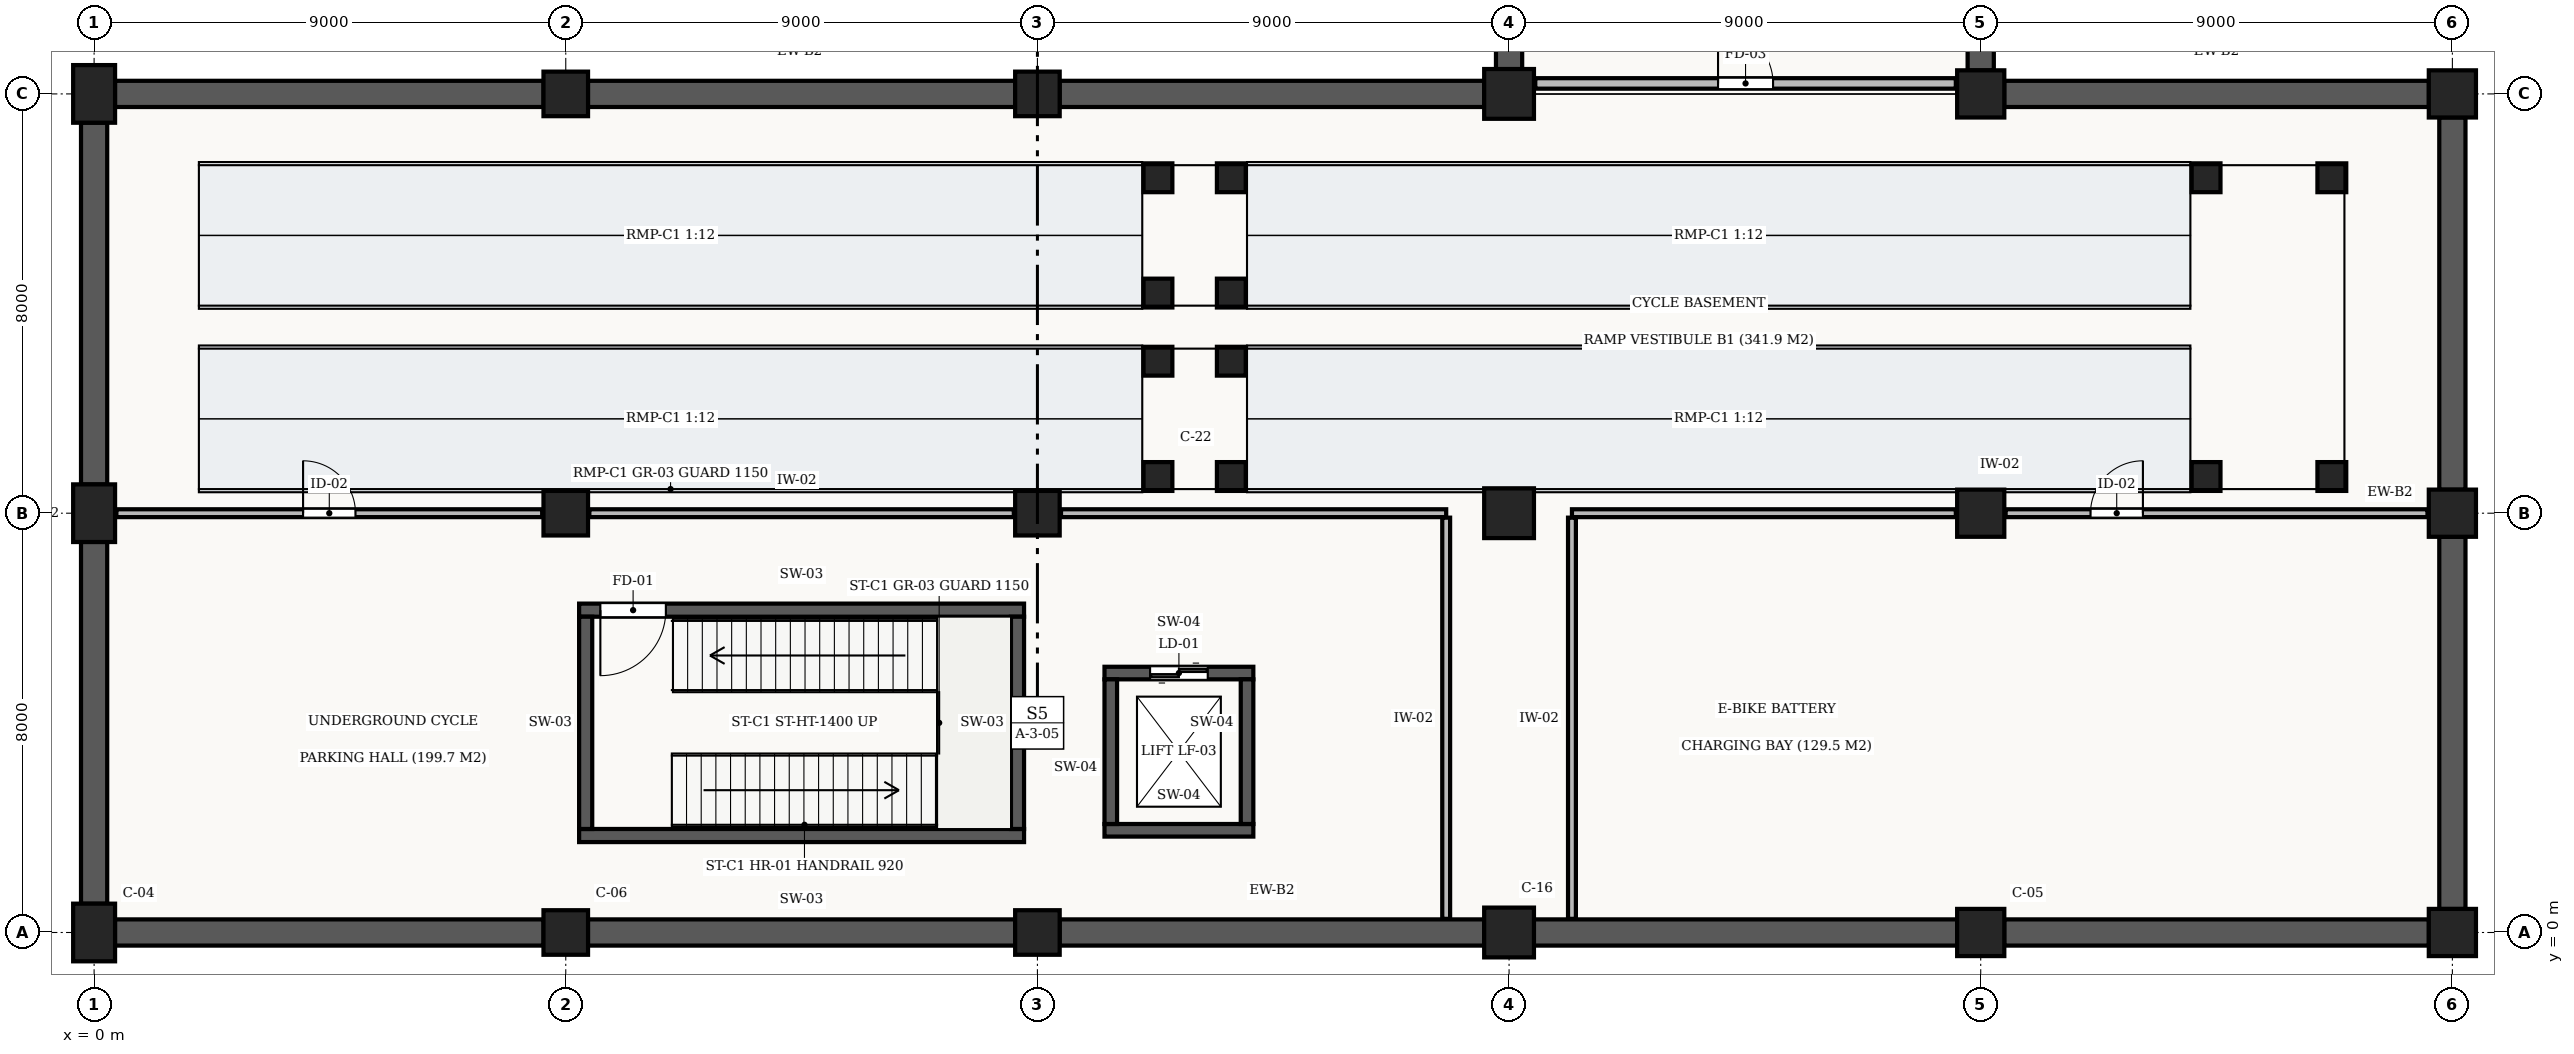
"""IFC4 building model, lengths in metres.
Left out: names, types, materials, properties, quantities, classifications, styles, units other than length and angle.
Written with IfcOpenShell. Run it as: python <this file> out.ifc"""

import sys

from ifc_helpers import new_model, si_unit, direction, frame, frame_2d, origin, origin_2d, place, context, subcontext, project, spatial, rectangle, extrude, element, fill, save


model = new_model("IFC4")
c1 = context("Model", 3, precision=1e-05, world=origin(), true_north=direction((0.0, 1.0)))
c2 = subcontext(c1, "Body", "Model", "MODEL_VIEW")
j1 = project(units=[si_unit("LENGTHUNIT", "METRE"), si_unit("PLANEANGLEUNIT", "RADIAN")], contexts=[c1])
p1 = place(None, origin())
s1 = spatial("IfcSite", under=j1, at=p1, CompositionType="ELEMENT")
p2 = place(p1, origin())
s2 = spatial("IfcBuilding", under=s1, at=p2, CompositionType="ELEMENT")
p3 = place(p2, frame((0.0, 0.0, -6.0)))
s3 = spatial("IfcBuildingStorey", under=s2, at=p3, CompositionType="ELEMENT", Elevation=-6.0)
for number, where, z_axis, x_axis in (
    (1, (0.0, 0.0, 0.0), (0.0, 0.0, 1.0), (1.0, 0.0, 0.0)),
    (2, (0.0, 8.0, 0.0), (0.0, 0.0, 1.0), (1.0, 0.0, 0.0)),
    (3, (0.0, 16.0, 0.0), (0.0, 0.0, 1.0), (1.0, 0.0, 0.0)),
):
    element("IfcColumn", number, at=place(p3, frame(where, z_axis=z_axis, x_axis=x_axis)), inside=s3, PredefinedType="COLUMN", context=c2, shape_type="SweptSolid", body=[
        extrude(rectangle(XDim=0.8, YDim=1.1, at=origin_2d()), origin(), (0.0, 0.0, 1.0), 6.0),
    ])
for number, where, z_axis, x_axis in (
    (4, (9.0, 0.0, 0.0), (0.0, 0.0, 1.0), (1.0, 0.0, 0.0)),
    (5, (9.0, 8.0, 0.0), (0.0, 0.0, 1.0), (1.0, 0.0, 0.0)),
    (6, (9.0, 16.0, 0.0), (0.0, 0.0, 1.0), (1.0, 0.0, 0.0)),
    (7, (18.0, 0.0, 0.0), (0.0, 0.0, 1.0), (1.0, 0.0, 0.0)),
    (8, (18.0, 8.0, 0.0), (0.0, 0.0, 1.0), (1.0, 0.0, 0.0)),
    (9, (18.0, 16.0, 0.0), (0.0, 0.0, 1.0), (1.0, 0.0, 0.0)),
):
    element("IfcColumn", number, at=place(p3, frame(where, z_axis=z_axis, x_axis=x_axis)), inside=s3, PredefinedType="COLUMN", context=c2, shape_type="SweptSolid", body=[
        extrude(rectangle(XDim=0.85, YDim=0.85, at=origin_2d()), origin(), (0.0, 0.0, 1.0), 6.0),
    ])
for number, where, z_axis, x_axis in (
    (10, (27.0, 0.0, 0.0), (0.0, 0.0, 1.0), (1.0, 0.0, 0.0)),
    (11, (27.0, 8.0, 0.0), (0.0, 0.0, 1.0), (1.0, 0.0, 0.0)),
    (12, (27.0, 16.0, 0.0), (0.0, 0.0, 1.0), (1.0, 0.0, 0.0)),
):
    element("IfcColumn", number, at=place(p3, frame(where, z_axis=z_axis, x_axis=x_axis)), inside=s3, PredefinedType="COLUMN", context=c2, shape_type="SweptSolid", body=[
        extrude(rectangle(XDim=0.95, YDim=0.95, at=origin_2d()), origin(), (0.0, 0.0, 1.0), 6.0),
    ])
for number, where, z_axis, x_axis in (
    (13, (36.0, 0.0, 0.0), (0.0, 0.0, 1.0), (1.0, 0.0, 0.0)),
    (14, (36.0, 8.0, 0.0), (0.0, 0.0, 1.0), (1.0, 0.0, 0.0)),
    (15, (36.0, 16.0, 0.0), (0.0, 0.0, 1.0), (1.0, 0.0, 0.0)),
    (16, (45.0, 0.0, 0.0), (0.0, 0.0, 1.0), (1.0, 0.0, 0.0)),
    (17, (45.0, 8.0, 0.0), (0.0, 0.0, 1.0), (1.0, 0.0, 0.0)),
    (18, (45.0, 16.0, 0.0), (0.0, 0.0, 1.0), (1.0, 0.0, 0.0)),
):
    element("IfcColumn", number, at=place(p3, frame(where, z_axis=z_axis, x_axis=x_axis)), inside=s3, PredefinedType="COLUMN", context=c2, shape_type="SweptSolid", body=[
        extrude(rectangle(XDim=0.9, YDim=0.9, at=origin_2d()), origin(), (0.0, 0.0, 1.0), 6.0),
    ])
for number, where, z_axis, x_axis in (
    (19, (20.3, 8.7, 0.0), (0.0, 0.0, 1.0), (1.0, 0.0, 0.0)),
    (20, (21.7, 8.7, 0.0), (0.0, 0.0, 1.0), (1.0, 0.0, 0.0)),
    (21, (20.3, 10.9, 0.0), (0.0, 0.0, 1.0), (1.0, 0.0, 0.0)),
    (22, (21.7, 10.9, 0.0), (0.0, 0.0, 1.0), (1.0, 0.0, 0.0)),
):
    element("IfcColumn", number, at=place(p3, frame(where, z_axis=z_axis, x_axis=x_axis)), inside=s3, PredefinedType="COLUMN", context=c2, shape_type="SweptSolid", body=[
        extrude(rectangle(XDim=0.55, YDim=0.55, at=origin_2d()), origin(), (0.0, 0.0, 1.0), 1.22),
    ])
for number, where, z_axis, x_axis in (
    (23, (40.3, 8.7, 0.0), (0.0, 0.0, 1.0), (1.0, 0.0, 0.0)),
    (24, (42.7, 8.7, 0.0), (0.0, 0.0, 1.0), (1.0, 0.0, 0.0)),
    (25, (40.3, 14.4, 0.0), (0.0, 0.0, 1.0), (1.0, 0.0, 0.0)),
    (26, (42.7, 14.4, 0.0), (0.0, 0.0, 1.0), (1.0, 0.0, 0.0)),
):
    element("IfcColumn", number, at=place(p3, frame(where, z_axis=z_axis, x_axis=x_axis)), inside=s3, PredefinedType="COLUMN", context=c2, shape_type="SweptSolid", body=[
        extrude(rectangle(XDim=0.55, YDim=0.55, at=origin_2d()), origin(), (0.0, 0.0, 1.0), 2.72),
    ])
for number, where, z_axis, x_axis in (
    (27, (20.3, 12.2, 0.0), (0.0, 0.0, 1.0), (1.0, 0.0, 0.0)),
    (28, (21.7, 12.2, 0.0), (0.0, 0.0, 1.0), (1.0, 0.0, 0.0)),
    (29, (20.3, 14.4, 0.0), (0.0, 0.0, 1.0), (1.0, 0.0, 0.0)),
    (30, (21.7, 14.4, 0.0), (0.0, 0.0, 1.0), (1.0, 0.0, 0.0)),
):
    element("IfcColumn", number, at=place(p3, frame(where, z_axis=z_axis, x_axis=x_axis)), inside=s3, PredefinedType="COLUMN", context=c2, shape_type="SweptSolid", body=[
        extrude(rectangle(XDim=0.55, YDim=0.55, at=origin_2d()), origin(), (0.0, 0.0, 1.0), 4.22),
    ])
for number, where, z_axis, x_axis in (
    (31, (0.0, 0.548, 0.0), (0.0, 0.0, 1.0), (0.0, 1.0, 0.0)),
    (32, (0.0, 8.548, 0.0), (0.0, 0.0, 1.0), (0.0, 1.0, 0.0)),
):
    element("IfcWall", number, at=place(p3, frame(where, z_axis=z_axis, x_axis=x_axis)), inside=s3, PredefinedType="STANDARD", context=c2, shape_type="SweptSolid", body=[
        extrude(rectangle(XDim=6.904, YDim=0.5, at=frame_2d((3.452, 0.0))), origin(), (0.0, 0.0, 1.0), 5.56),
    ])
p4 = place(p3, frame((0.398, 16.0, 0.0), z_axis=(0.0, 0.0, 1.0), x_axis=(1.0, 0.0, 0.0)))
e33 = element("IfcWall", 33, at=p4, inside=s3, PredefinedType="STANDARD", context=c2, shape_type="SweptSolid", body=[
    extrude(rectangle(XDim=8.179, YDim=0.5, at=frame_2d((4.089, 0.0))), origin(), (0.0, 0.0, 1.0), 5.56),
])
p5 = place(p3, frame((9.423, 16.0, 0.0), z_axis=(0.0, 0.0, 1.0), x_axis=(1.0, 0.0, 0.0)))
e34 = element("IfcWall", 34, at=p5, inside=s3, PredefinedType="STANDARD", context=c2, shape_type="SweptSolid", body=[
    extrude(rectangle(XDim=8.154, YDim=0.5, at=frame_2d((4.077, 0.0))), origin(), (0.0, 0.0, 1.0), 5.56),
])
p6 = place(p3, frame((18.423, 16.0, 0.0), z_axis=(0.0, 0.0, 1.0), x_axis=(1.0, 0.0, 0.0)))
e35 = element("IfcWall", 35, at=p6, inside=s3, PredefinedType="STANDARD", context=c2, shape_type="SweptSolid", body=[
    extrude(rectangle(XDim=8.104, YDim=0.5, at=frame_2d((4.052, 0.0))), origin(), (0.0, 0.0, 1.0), 5.56),
])
p7 = place(p3, frame((27.0, 16.473, 0.0), z_axis=(0.0, 0.0, 1.0), x_axis=(0.0, 1.0, 0.0)))
e36 = element("IfcWall", 36, at=p7, inside=s3, PredefinedType="STANDARD", context=c2, shape_type="SweptSolid", body=[
    extrude(rectangle(XDim=7.054, YDim=0.5, at=frame_2d((3.527, 0.0))), origin(), (0.0, 0.0, 1.0), 5.56),
])
p8 = place(p3, frame((36.0, 23.552, 0.0), z_axis=(0.0, 0.0, 1.0), x_axis=(0.0, -1.0, 0.0)))
e37 = element("IfcWall", 37, at=p8, inside=s3, PredefinedType="STANDARD", context=c2, shape_type="SweptSolid", body=[
    extrude(rectangle(XDim=7.104, YDim=0.5, at=frame_2d((3.552, 0.0))), origin(), (0.0, 0.0, 1.0), 5.56),
])
p9 = place(p3, frame((36.448, 16.0, 0.0), z_axis=(0.0, 0.0, 1.0), x_axis=(1.0, 0.0, 0.0)))
e38 = element("IfcWall", 38, at=p9, inside=s3, PredefinedType="STANDARD", context=c2, shape_type="SweptSolid", body=[
    extrude(rectangle(XDim=8.104, YDim=0.5, at=frame_2d((4.052, 0.0))), origin(), (0.0, 0.0, 1.0), 5.56),
])
for number, where, z_axis, x_axis in (
    (39, (45.0, 15.552, 0.0), (0.0, 0.0, 1.0), (0.0, -1.0, 0.0)),
    (40, (45.0, 7.552, 0.0), (0.0, 0.0, 1.0), (0.0, -1.0, 0.0)),
):
    element("IfcWall", number, at=place(p3, frame(where, z_axis=z_axis, x_axis=x_axis)), inside=s3, PredefinedType="STANDARD", context=c2, shape_type="SweptSolid", body=[
        extrude(rectangle(XDim=7.104, YDim=0.5, at=frame_2d((3.552, 0.0))), origin(), (0.0, 0.0, 1.0), 5.56),
    ])
p10 = place(p3, frame((44.552, 0.0, 0.0), z_axis=(0.0, 0.0, 1.0), x_axis=(-1.0, 0.0, 0.0)))
e41 = element("IfcWall", 41, at=p10, inside=s3, PredefinedType="STANDARD", context=c2, shape_type="SweptSolid", body=[
    extrude(rectangle(XDim=8.104, YDim=0.5, at=frame_2d((4.052, 0.0))), origin(), (0.0, 0.0, 1.0), 5.56),
])
p11 = place(p3, frame((35.552, 0.0, 0.0), z_axis=(0.0, 0.0, 1.0), x_axis=(-1.0, 0.0, 0.0)))
e42 = element("IfcWall", 42, at=p11, inside=s3, PredefinedType="STANDARD", context=c2, shape_type="SweptSolid", body=[
    extrude(rectangle(XDim=8.079, YDim=0.5, at=frame_2d((4.04, 0.0))), origin(), (0.0, 0.0, 1.0), 5.56),
])
p12 = place(p3, frame((26.527, 0.0, 0.0), z_axis=(0.0, 0.0, 1.0), x_axis=(-1.0, 0.0, 0.0)))
e43 = element("IfcWall", 43, at=p12, inside=s3, PredefinedType="STANDARD", context=c2, shape_type="SweptSolid", body=[
    extrude(rectangle(XDim=8.104, YDim=0.5, at=frame_2d((4.052, 0.0))), origin(), (0.0, 0.0, 1.0), 5.56),
])
p13 = place(p3, frame((17.577, 0.0, 0.0), z_axis=(0.0, 0.0, 1.0), x_axis=(-1.0, 0.0, 0.0)))
e44 = element("IfcWall", 44, at=p13, inside=s3, PredefinedType="STANDARD", context=c2, shape_type="SweptSolid", body=[
    extrude(rectangle(XDim=8.154, YDim=0.5, at=frame_2d((4.077, 0.0))), origin(), (0.0, 0.0, 1.0), 5.56),
])
p14 = place(p3, frame((8.577, 0.0, 0.0), z_axis=(0.0, 0.0, 1.0), x_axis=(-1.0, 0.0, 0.0)))
e45 = element("IfcWall", 45, at=p14, inside=s3, PredefinedType="STANDARD", context=c2, shape_type="SweptSolid", body=[
    extrude(rectangle(XDim=8.179, YDim=0.5, at=frame_2d((4.089, 0.0))), origin(), (0.0, 0.0, 1.0), 5.56),
])
p15 = place(p3, frame((9.255, 1.85, 0.0), z_axis=(0.0, 0.0, 1.0), x_axis=(1.0, 0.0, 0.0)))
e46 = element("IfcWall", 46, at=p15, inside=s3, PredefinedType="SHEAR", context=c2, shape_type="SweptSolid", body=[
    extrude(rectangle(XDim=8.49, YDim=0.25, at=frame_2d((4.245, 0.0))), origin(), (0.0, 0.0, 1.0), 5.55),
])
p16 = place(p3, frame((17.745, 6.15, 0.0), z_axis=(0.0, 0.0, 1.0), x_axis=(-1.0, 0.0, 0.0)))
e47 = element("IfcWall", 47, at=p16, inside=s3, PredefinedType="SHEAR", context=c2, shape_type="SweptSolid", body=[
    extrude(rectangle(XDim=8.49, YDim=0.25, at=frame_2d((4.245, 0.0))), origin(), (0.0, 0.0, 1.0), 5.55),
])
p17 = place(p16, frame((6.835, 0.0, 0.0)))
e48 = element("IfcOpeningElement", 48, at=p17, cuts=e47, PredefinedType="OPENING", context=c2, shape_type="SweptSolid", body=[
    extrude(rectangle(XDim=1.25, YDim=2.15, at=frame_2d((0.625, 1.075))), frame((0.0, 0.137, 0.0), z_axis=(0.0, -1.0, 0.0), x_axis=(1.0, 0.0, 0.0)), (0.0, 0.0, 1.0), 0.274),
])
for number, where, z_axis, x_axis in (
    (49, (9.38, 6.025, 0.0), (0.0, 0.0, 1.0), (0.0, -1.0, 0.0)),
    (50, (17.62, 1.975, 0.0), (0.0, 0.0, 1.0), (0.0, 1.0, 0.0)),
):
    element("IfcWall", number, at=place(p3, frame(where, z_axis=z_axis, x_axis=x_axis)), inside=s3, PredefinedType="SHEAR", context=c2, shape_type="SweptSolid", body=[
        extrude(rectangle(XDim=4.05, YDim=0.25, at=frame_2d((2.025, 0.0))), origin(), (0.0, 0.0, 1.0), 5.55),
    ])
p18 = place(p3, frame((19.28, 1.95, 0.0), z_axis=(0.0, 0.0, 1.0), x_axis=(1.0, 0.0, 0.0)))
e51 = element("IfcWall", 51, at=p18, inside=s3, PredefinedType="SHEAR", context=c2, shape_type="SweptSolid", body=[
    extrude(rectangle(XDim=2.84, YDim=0.24, at=frame_2d((1.42, 0.0))), origin(), (0.0, 0.0, 1.0), 5.55),
])
p19 = place(p3, frame((22.12, 4.95, 0.0), z_axis=(0.0, 0.0, 1.0), x_axis=(-1.0, 0.0, 0.0)))
e52 = element("IfcWall", 52, at=p19, inside=s3, PredefinedType="SHEAR", context=c2, shape_type="SweptSolid", body=[
    extrude(rectangle(XDim=2.84, YDim=0.24, at=frame_2d((1.42, 0.0))), origin(), (0.0, 0.0, 1.0), 5.55),
])
p20 = place(p19, frame((0.87, 0.0, 0.0)))
e53 = element("IfcOpeningElement", 53, at=p20, cuts=e52, PredefinedType="OPENING", context=c2, shape_type="SweptSolid", body=[
    extrude(rectangle(XDim=1.1, YDim=2.2, at=frame_2d((0.55, 1.1))), frame((0.0, 0.132, 0.0), z_axis=(0.0, -1.0, 0.0), x_axis=(1.0, 0.0, 0.0)), (0.0, 0.0, 1.0), 0.264),
])
for number, where, z_axis, x_axis in (
    (54, (19.4, 4.83, 0.0), (0.0, 0.0, 1.0), (0.0, -1.0, 0.0)),
    (55, (22.0, 2.07, 0.0), (0.0, 0.0, 1.0), (0.0, 1.0, 0.0)),
):
    element("IfcWall", number, at=place(p3, frame(where, z_axis=z_axis, x_axis=x_axis)), inside=s3, PredefinedType="SHEAR", context=c2, shape_type="SweptSolid", body=[
        extrude(rectangle(XDim=2.76, YDim=0.24, at=frame_2d((1.38, 0.0))), origin(), (0.0, 0.0, 1.0), 5.55),
    ])
p21 = place(p3, frame((0.425, 8.0, 0.0), z_axis=(0.0, 0.0, 1.0), x_axis=(1.0, 0.0, 0.0)))
e56 = element("IfcWall", 56, at=p21, inside=s3, PredefinedType="STANDARD", context=c2, shape_type="SweptSolid", body=[
    extrude(rectangle(XDim=8.125, YDim=0.15, at=frame_2d((4.062, 0.0))), origin(), (0.0, 0.0, 1.0), 4.43),
])
p22 = place(p21, frame((3.562, 0.0, 0.0)))
e57 = element("IfcOpeningElement", 57, at=p22, cuts=e56, PredefinedType="OPENING", context=c2, shape_type="SweptSolid", body=[
    extrude(rectangle(XDim=1.0, YDim=2.1, at=frame_2d((0.5, 1.05))), frame((0.0, 0.087, 0.0), z_axis=(0.0, -1.0, 0.0), x_axis=(1.0, 0.0, 0.0)), (0.0, 0.0, 1.0), 0.174),
])
p23 = place(p3, frame((9.45, 8.0, 0.0), z_axis=(0.0, 0.0, 1.0), x_axis=(1.0, 0.0, 0.0)))
e58 = element("IfcWall", 58, at=p23, inside=s3, PredefinedType="STANDARD", context=c2, shape_type="SweptSolid", body=[
    extrude(rectangle(XDim=8.1, YDim=0.15, at=frame_2d((4.05, 0.0))), origin(), (0.0, 0.0, 1.0), 4.43),
])
p24 = place(p3, frame((18.45, 8.0, 0.0), z_axis=(0.0, 0.0, 1.0), x_axis=(1.0, 0.0, 0.0)))
e59 = element("IfcWall", 59, at=p24, inside=s3, PredefinedType="STANDARD", context=c2, shape_type="SweptSolid", body=[
    extrude(rectangle(XDim=7.35, YDim=0.15, at=frame_2d((3.675, 0.0))), origin(), (0.0, 0.0, 1.0), 4.43),
])
p25 = place(p3, frame((25.8, 0.26, 0.0), z_axis=(0.0, 0.0, 1.0), x_axis=(0.0, 1.0, 0.0)))
e60 = element("IfcWall", 60, at=p25, inside=s3, PredefinedType="STANDARD", context=c2, shape_type="SweptSolid", body=[
    extrude(rectangle(XDim=7.655, YDim=0.15, at=frame_2d((3.828, 0.0))), origin(), (0.0, 0.0, 1.0), 5.55),
])
p26 = place(p3, frame((28.2, 8.0, 0.0), z_axis=(0.0, 0.0, 1.0), x_axis=(1.0, 0.0, 0.0)))
e61 = element("IfcWall", 61, at=p26, inside=s3, PredefinedType="STANDARD", context=c2, shape_type="SweptSolid", body=[
    extrude(rectangle(XDim=7.325, YDim=0.15, at=frame_2d((3.663, 0.0))), origin(), (0.0, 0.0, 1.0), 4.43),
])
p27 = place(p3, frame((36.475, 8.0, 0.0), z_axis=(0.0, 0.0, 1.0), x_axis=(1.0, 0.0, 0.0)))
e62 = element("IfcWall", 62, at=p27, inside=s3, PredefinedType="STANDARD", context=c2, shape_type="SweptSolid", body=[
    extrude(rectangle(XDim=8.05, YDim=0.15, at=frame_2d((4.025, 0.0))), origin(), (0.0, 0.0, 1.0), 4.38),
])
p28 = place(p27, frame((1.62, 0.0, 0.0)))
e63 = element("IfcOpeningElement", 63, at=p28, cuts=e62, PredefinedType="OPENING", context=c2, shape_type="SweptSolid", body=[
    extrude(rectangle(XDim=1.0, YDim=2.1, at=frame_2d((0.5, 1.05))), frame((0.0, 0.087, 0.0), z_axis=(0.0, -1.0, 0.0), x_axis=(1.0, 0.0, 0.0)), (0.0, 0.0, 1.0), 0.174),
])
p29 = place(p3, frame((28.2, 0.26, 0.0), z_axis=(0.0, 0.0, 1.0), x_axis=(0.0, 1.0, 0.0)))
e64 = element("IfcWall", 64, at=p29, inside=s3, PredefinedType="STANDARD", context=c2, shape_type="SweptSolid", body=[
    extrude(rectangle(XDim=7.655, YDim=0.15, at=frame_2d((3.828, 0.0))), origin(), (0.0, 0.0, 1.0), 5.55),
])
p30 = place(p3, frame((27.5, 16.2, 0.0), z_axis=(0.0, 0.0, 1.0), x_axis=(1.0, 0.0, 0.0)))
e65 = element("IfcWall", 65, at=p30, inside=s3, PredefinedType="STANDARD", context=c2, shape_type="SweptSolid", body=[
    extrude(rectangle(XDim=8.025, YDim=0.2, at=frame_2d((4.012, 0.0))), origin(), (0.0, 0.0, 1.0), 4.43),
])
p31 = place(p30, frame((3.488, 0.0, 0.0)))
e66 = element("IfcOpeningElement", 66, at=p31, cuts=e65, PredefinedType="OPENING", context=c2, shape_type="SweptSolid", body=[
    extrude(rectangle(XDim=1.05, YDim=2.15, at=frame_2d((0.525, 1.075))), frame((0.0, 0.112, 0.0), z_axis=(0.0, -1.0, 0.0), x_axis=(1.0, 0.0, 0.0)), (0.0, 0.0, 1.0), 0.224),
])
p32 = place(p17, origin())
e67 = element("IfcDoor", 67, at=p32, inside=s3, OperationType="SINGLE_SWING_RIGHT", PredefinedType="DOOR", context=c2, shape_type="SweptSolid", body=[
    extrude(rectangle(XDim=1.25, YDim=2.15, at=frame_2d((0.625, 1.075))), frame((0.0, 0.025, 0.0), z_axis=(0.0, -1.0, 0.0), x_axis=(1.0, 0.0, 0.0)), (0.0, 0.0, 1.0), 0.05),
])
fill(e48, e67)
p33 = place(p20, origin())
e68 = element("IfcDoor", 68, at=p33, inside=s3, OperationType="DOUBLE_DOOR_SLIDING", PredefinedType="DOOR", context=c2, shape_type="SweptSolid", body=[
    extrude(rectangle(XDim=1.1, YDim=2.2, at=frame_2d((0.55, 1.1))), frame((0.0, 0.025, 0.0), z_axis=(0.0, -1.0, 0.0), x_axis=(1.0, 0.0, 0.0)), (0.0, 0.0, 1.0), 0.05),
])
fill(e53, e68)
p34 = place(p22, origin())
e69 = element("IfcDoor", 69, at=p34, inside=s3, OperationType="SINGLE_SWING_LEFT", PredefinedType="DOOR", context=c2, shape_type="SweptSolid", body=[
    extrude(rectangle(XDim=1.0, YDim=2.1, at=frame_2d((0.5, 1.05))), frame((0.0, 0.025, 0.0), z_axis=(0.0, -1.0, 0.0), x_axis=(1.0, 0.0, 0.0)), (0.0, 0.0, 1.0), 0.05),
])
fill(e57, e69)
p35 = place(p28, origin())
e70 = element("IfcDoor", 70, at=p35, inside=s3, OperationType="SINGLE_SWING_RIGHT", PredefinedType="DOOR", context=c2, shape_type="SweptSolid", body=[
    extrude(rectangle(XDim=1.0, YDim=2.1, at=frame_2d((0.5, 1.05))), frame((0.0, 0.025, 0.0), z_axis=(0.0, -1.0, 0.0), x_axis=(1.0, 0.0, 0.0)), (0.0, 0.0, 1.0), 0.05),
])
fill(e63, e70)
p36 = place(p31, origin())
e71 = element("IfcDoor", 71, at=p36, inside=s3, OperationType="SINGLE_SWING_LEFT", PredefinedType="DOOR", context=c2, shape_type="SweptSolid", body=[
    extrude(rectangle(XDim=1.05, YDim=2.15, at=frame_2d((0.525, 1.075))), frame((0.0, 0.025, 0.0), z_axis=(0.0, -1.0, 0.0), x_axis=(1.0, 0.0, 0.0)), (0.0, 0.0, 1.0), 0.05),
])
fill(e66, e71)
save(model, sys.argv[1])
